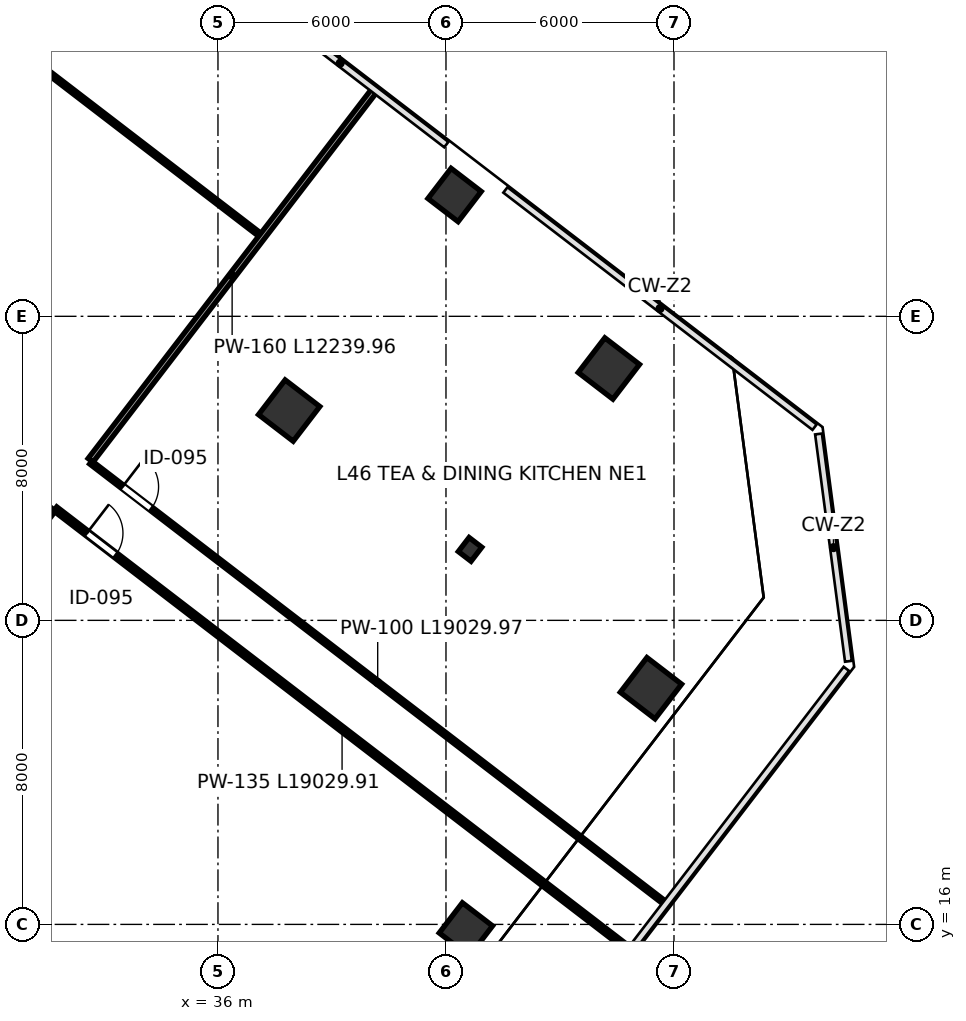
"""IFC4 building model, lengths in metres.
Left out: names, types, materials, properties, quantities, classifications, styles, units other than length and angle.
Written with IfcOpenShell. Run it as: python <this file> out.ifc"""

import sys

from ifc_helpers import new_model, si_unit, direction, frame, frame_2d, origin, origin_2d, place, context, subcontext, project, spatial, rectangle, i_section, extrude, source, transform, mapped, element, fill, save


model = new_model("IFC4")
c1 = context("Model", 3, precision=1e-05, world=origin(), true_north=direction((0.0, 1.0)))
c2 = subcontext(c1, "Body", "Model", "MODEL_VIEW")
j1 = project(units=[si_unit("LENGTHUNIT", "METRE"), si_unit("PLANEANGLEUNIT", "RADIAN")], contexts=[c1])
p1 = place(None, origin())
s1 = spatial("IfcSite", under=j1, at=p1, CompositionType="ELEMENT")
p2 = place(p1, origin())
s2 = spatial("IfcBuilding", under=s1, at=p2, CompositionType="ELEMENT")
p3 = place(p2, frame((0.0, 0.0, 204.4)))
s3 = spatial("IfcBuildingStorey", under=s2, at=p3, CompositionType="ELEMENT", Elevation=204.4)
m1 = source(origin(), c2, "Body", "SweptSolid", [
    extrude(rectangle(XDim=1.15, YDim=1.15, at=origin_2d()), origin(), (0.0, 0.0, 1.0), 5.399),
])
p4 = place(p3, frame((37.874, 29.52, 0.001), z_axis=(0.0, 0.0, 1.0), x_axis=(-0.793353340291, 0.608761429009, 0.0)))
e1 = element("IfcColumn", 1, at=p4, inside=s3, PredefinedType="COLUMN", context=c2, shape_type="MappedRepresentation", body=[
    mapped(m1, transform((0.0, 0.0, 0.0), scale=1.0)),
])
m2 = source(origin(), c2, "Body", "SweptSolid", [
    extrude(rectangle(XDim=1.0, YDim=1.0, at=origin_2d()), origin(), (0.0, 0.0, 1.0), 5.399),
])
p5 = place(p3, frame((42.226, 35.192, 0.001), z_axis=(0.0, 0.0, 1.0), x_axis=(-0.793353340291, 0.608761429009, 0.0)))
e2 = element("IfcColumn", 2, at=p5, inside=s3, PredefinedType="COLUMN", context=c2, shape_type="MappedRepresentation", body=[
    mapped(m2, transform((0.0, 0.0, 0.0), scale=1.0)),
])
m3 = source(origin(), c2, "Body", "SweptSolid", [
    extrude(i_section(OverallWidth=0.421, OverallDepth=0.465, WebThickness=0.045, FlangeThickness=0.072, FilletRadius=0.015, at=origin_2d()), origin(), (0.0, 0.0, 1.0), 5.399),
])
p6 = place(p3, frame((42.634, 25.867, 0.001), z_axis=(0.0, 0.0, 1.0), x_axis=(-0.793353340291, 0.608761429009, 0.0)))
e3 = element("IfcColumn", 3, at=p6, inside=s3, PredefinedType="COLUMN", context=c2, shape_type="MappedRepresentation", body=[
    mapped(m3, transform((0.0, 0.0, 0.0), scale=1.0)),
])
p7 = place(p3, frame((46.286, 30.627, 0.001), z_axis=(0.0, 0.0, 1.0), x_axis=(-0.793353340291, 0.608761429009, 0.0)))
e4 = element("IfcColumn", 4, at=p7, inside=s3, PredefinedType="COLUMN", context=c2, shape_type="MappedRepresentation", body=[
    mapped(m1, transform((0.0, 0.0, 0.0), scale=1.0)),
])
p8 = place(p3, frame((42.524, 15.868, 0.001), z_axis=(0.0, 0.0, 1.0), x_axis=(-0.793353340291, 0.608761429009, 0.0)))
e5 = element("IfcColumn", 5, at=p8, inside=s3, PredefinedType="COLUMN", context=c2, shape_type="MappedRepresentation", body=[
    mapped(m2, transform((0.0, 0.0, 0.0), scale=1.0)),
])
m4 = source(origin(), c2, "Body", "SweptSolid", [
    extrude(rectangle(XDim=1.15, YDim=1.15, at=origin_2d()), origin(), (0.0, 0.0, 1.0), 5.399),
])
p9 = place(p3, frame((47.394, 22.215, 0.001), z_axis=(0.0, 0.0, 1.0), x_axis=(-0.793353340291, 0.608761429009, 0.0)))
e6 = element("IfcColumn", 6, at=p9, inside=s3, PredefinedType="COLUMN", context=c2, shape_type="MappedRepresentation", body=[
    mapped(m4, transform((0.0, 0.0, 0.0), scale=1.0)),
])
p10 = place(p3, frame((14.418, 51.551, 0.0), z_axis=(0.0, 0.0, 1.0), x_axis=(0.793357597302, -0.608755881124, 0.0)))
e7 = element("IfcWall", 7, at=p10, inside=s3, PredefinedType="PARTITIONING", context=c2, shape_type="SweptSolid", body=[
    extrude(rectangle(XDim=28.63, YDim=0.1, at=frame_2d((14.315, 0.0))), origin(), (0.0, 0.0, 1.0), 5.12),
])
p11 = place(p10, frame((20.31, 0.0, 0.0)))
e8 = element("IfcOpeningElement", 8, at=p11, cuts=e7, PredefinedType="OPENING", context=c2, shape_type="SweptSolid", body=[
    extrude(rectangle(XDim=0.95, YDim=2.15, at=frame_2d((0.475, 1.075))), frame((0.0, 0.06, 0.0), z_axis=(0.0, -1.0, 0.0), x_axis=(1.0, 0.0, 0.0)), (0.0, 0.0, 1.0), 0.12),
])
p12 = place(p3, frame((32.647, 28.211, 0.0), z_axis=(0.0, 0.0, 1.0), x_axis=(0.608743464117, 0.793367124914, 0.0)))
e9 = element("IfcWall", 9, at=p12, inside=s3, PredefinedType="PARTITIONING", context=c2, shape_type="SweptSolid", body=[
    extrude(rectangle(XDim=12.24, YDim=0.16, at=frame_2d((6.12, 0.0))), origin(), (0.0, 0.0, 1.0), 4.355),
])
p13 = place(p3, frame((19.564, 11.16, 0.0), z_axis=(0.0, 0.0, 1.0), x_axis=(0.608754410964, 0.793358725377, 0.0)))
e10 = element("IfcWall", 10, at=p13, inside=s3, PredefinedType="PARTITIONING", context=c2, shape_type="SweptSolid", body=[
    extrude(rectangle(XDim=19.872, YDim=0.16, at=frame_2d((9.936, 0.0))), origin(), (0.0, 0.0, 1.0), 5.12),
])
p14 = place(p3, frame((32.654, 28.155, 0.0), z_axis=(0.0, 0.0, 1.0), x_axis=(0.793356444093, -0.608757384034, 0.0)))
e11 = element("IfcWall", 11, at=p14, inside=s3, PredefinedType="PARTITIONING", context=c2, shape_type="SweptSolid", body=[
    extrude(rectangle(XDim=19.03, YDim=0.1, at=frame_2d((9.515, 0.0))), origin(), (0.0, 0.0, 1.0), 4.413),
])
p15 = place(p14, frame((1.05, 0.0, 0.0)))
e12 = element("IfcOpeningElement", 12, at=p15, cuts=e11, PredefinedType="OPENING", context=c2, shape_type="SweptSolid", body=[
    extrude(rectangle(XDim=0.95, YDim=2.15, at=frame_2d((0.475, 1.075))), frame((0.0, 0.06, 0.0), z_axis=(0.0, -1.0, 0.0), x_axis=(1.0, 0.0, 0.0)), (0.0, 0.0, 1.0), 0.12),
])
p16 = place(p3, frame((31.717, 26.933, 0.0), z_axis=(0.0, 0.0, 1.0), x_axis=(0.793356444093, -0.608757384034, 0.0)))
e13 = element("IfcWall", 13, at=p16, inside=s3, PredefinedType="PARTITIONING", context=c2, shape_type="SweptSolid", body=[
    extrude(rectangle(XDim=19.03, YDim=0.135, at=frame_2d((9.515, 0.0))), origin(), (0.0, 0.0, 1.0), 4.413),
])
p17 = place(p16, frame((1.05, 0.0, 0.0)))
e14 = element("IfcOpeningElement", 14, at=p17, cuts=e13, PredefinedType="OPENING", context=c2, shape_type="SweptSolid", body=[
    extrude(rectangle(XDim=0.95, YDim=2.15, at=frame_2d((0.475, 1.075))), frame((0.0, 0.078, 0.0), z_axis=(0.0, -1.0, 0.0), x_axis=(1.0, 0.0, 0.0)), (0.0, 0.0, 1.0), 0.155),
])
m5 = source(origin(), c2, "Body", "SweptSolid", [
    extrude(rectangle(XDim=0.95, YDim=2.15, at=frame_2d((0.475, 1.075))), frame((0.0, 0.025, 0.0), z_axis=(0.0, -1.0, 0.0), x_axis=(1.0, 0.0, 0.0)), (0.0, 0.0, 1.0), 0.05),
])
p18 = place(p15, origin())
e15 = element("IfcDoor", 15, at=p18, inside=s3, OperationType="SINGLE_SWING_LEFT", PredefinedType="DOOR", context=c2, shape_type="MappedRepresentation", body=[
    mapped(m5, transform((0.0, 0.0, 0.0), scale=1.0)),
])
fill(e12, e15)
p19 = place(p17, origin())
e16 = element("IfcDoor", 16, at=p19, inside=s3, OperationType="SINGLE_SWING_LEFT", PredefinedType="DOOR", context=c2, shape_type="MappedRepresentation", body=[
    mapped(m5, transform((0.0, 0.0, 0.0), scale=1.0)),
])
fill(e14, e16)
save(model, sys.argv[1])
